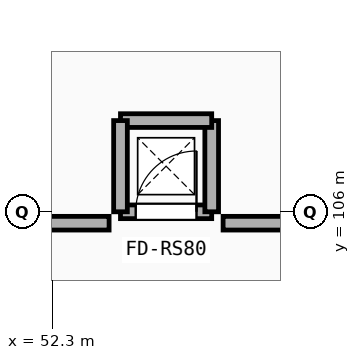
"""IFC4 building model, lengths in metres.
Left out: names, types, materials, properties, quantities, classifications, styles, units other than length and angle.
Written with IfcOpenShell. Run it as: python <this file> out.ifc"""

import sys

from ifc_helpers import new_model, si_unit, direction, frame, frame_2d, origin, place, context, subcontext, project, spatial, rectangle, extrude, element, fill, save


model = new_model("IFC4")
c1 = context("Model", 3, precision=1e-05, world=origin(), true_north=direction((0.0, 1.0)))
c2 = subcontext(c1, "Body", "Model", "MODEL_VIEW")
j1 = project(units=[si_unit("LENGTHUNIT", "METRE"), si_unit("PLANEANGLEUNIT", "RADIAN")], contexts=[c1])
p1 = place(None, origin())
s1 = spatial("IfcSite", under=j1, at=p1, CompositionType="ELEMENT")
p2 = place(p1, origin())
s2 = spatial("IfcBuilding", under=s1, at=p2, CompositionType="ELEMENT")
p3 = place(p2, frame((0.0, 0.0, 9.6)))
s3 = spatial("IfcBuildingStorey", under=s2, at=p3, CompositionType="ELEMENT", Elevation=9.6)
p4 = place(p3, frame((35.35, 105.85, 0.0), z_axis=(0.0, 0.0, 1.0), x_axis=(1.0, 0.0, 0.0)))
e1 = element("IfcWall", 1, at=p4, inside=s3, PredefinedType="PARTITIONING", context=c2, shape_type="SweptSolid", body=[
    extrude(rectangle(XDim=17.7, YDim=0.18, at=frame_2d((8.85, 0.0))), origin(), (0.0, 0.0, 1.0), 3.25),
])
p5 = place(p3, frame((54.55, 105.85, 0.0), z_axis=(0.0, 0.0, 1.0), x_axis=(1.0, 0.0, 0.0)))
e2 = element("IfcWall", 2, at=p5, inside=s3, PredefinedType="PARTITIONING", context=c2, shape_type="SweptSolid", body=[
    extrude(rectangle(XDim=5.75, YDim=0.18, at=frame_2d((2.875, 0.0))), origin(), (0.0, 0.0, 1.0), 3.25),
])
p6 = place(p3, frame((53.2, 106.0, 0.0), z_axis=(0.0, 0.0, 1.0), x_axis=(1.0, 0.0, 0.0)))
e3 = element("IfcWall", 3, at=p6, inside=s3, PredefinedType="SOLIDWALL", context=c2, shape_type="SweptSolid", body=[
    extrude(rectangle(XDim=1.2, YDim=0.18, at=frame_2d((0.6, 0.0))), origin(), (0.0, 0.0, 1.0), 3.97),
])
p7 = place(p6, frame((0.2, 0.0, -0.01)))
e4 = element("IfcOpeningElement", 4, at=p7, cuts=e3, PredefinedType="OPENING", context=c2, shape_type="SweptSolid", body=[
    extrude(rectangle(XDim=0.8, YDim=2.06, at=frame_2d((0.4, 1.03))), frame((0.0, 0.1, 0.0), z_axis=(0.0, -1.0, 0.0), x_axis=(1.0, 0.0, 0.0)), (0.0, 0.0, 1.0), 0.2),
])
for number, where, z_axis, x_axis in (
    (5, (54.4, 106.0, 0.0), (0.0, 0.0, 1.0), (0.0, 1.0, 0.0)),
    (6, (54.4, 107.2, 0.0), (0.0, 0.0, 1.0), (-1.0, 0.0, 0.0)),
    (7, (53.2, 107.2, 0.0), (0.0, 0.0, 1.0), (0.0, -1.0, 0.0)),
):
    element("IfcWall", number, at=place(p3, frame(where, z_axis=z_axis, x_axis=x_axis)), inside=s3, PredefinedType="SOLIDWALL", context=c2, shape_type="SweptSolid", body=[
        extrude(rectangle(XDim=1.2, YDim=0.18, at=frame_2d((0.6, 0.0))), origin(), (0.0, 0.0, 1.0), 3.97),
    ])
p8 = place(p7, frame((0.0, 0.0, 0.01)))
e8 = element("IfcDoor", 8, at=p8, inside=s3, OperationType="SINGLE_SWING_RIGHT", PredefinedType="DOOR", context=c2, shape_type="SweptSolid", body=[
    extrude(rectangle(XDim=0.8, YDim=2.05, at=frame_2d((0.4, 1.025))), frame((0.0, 0.025, 0.0), z_axis=(0.0, -1.0, 0.0), x_axis=(1.0, 0.0, 0.0)), (0.0, 0.0, 1.0), 0.05),
])
fill(e4, e8)
save(model, sys.argv[1])
